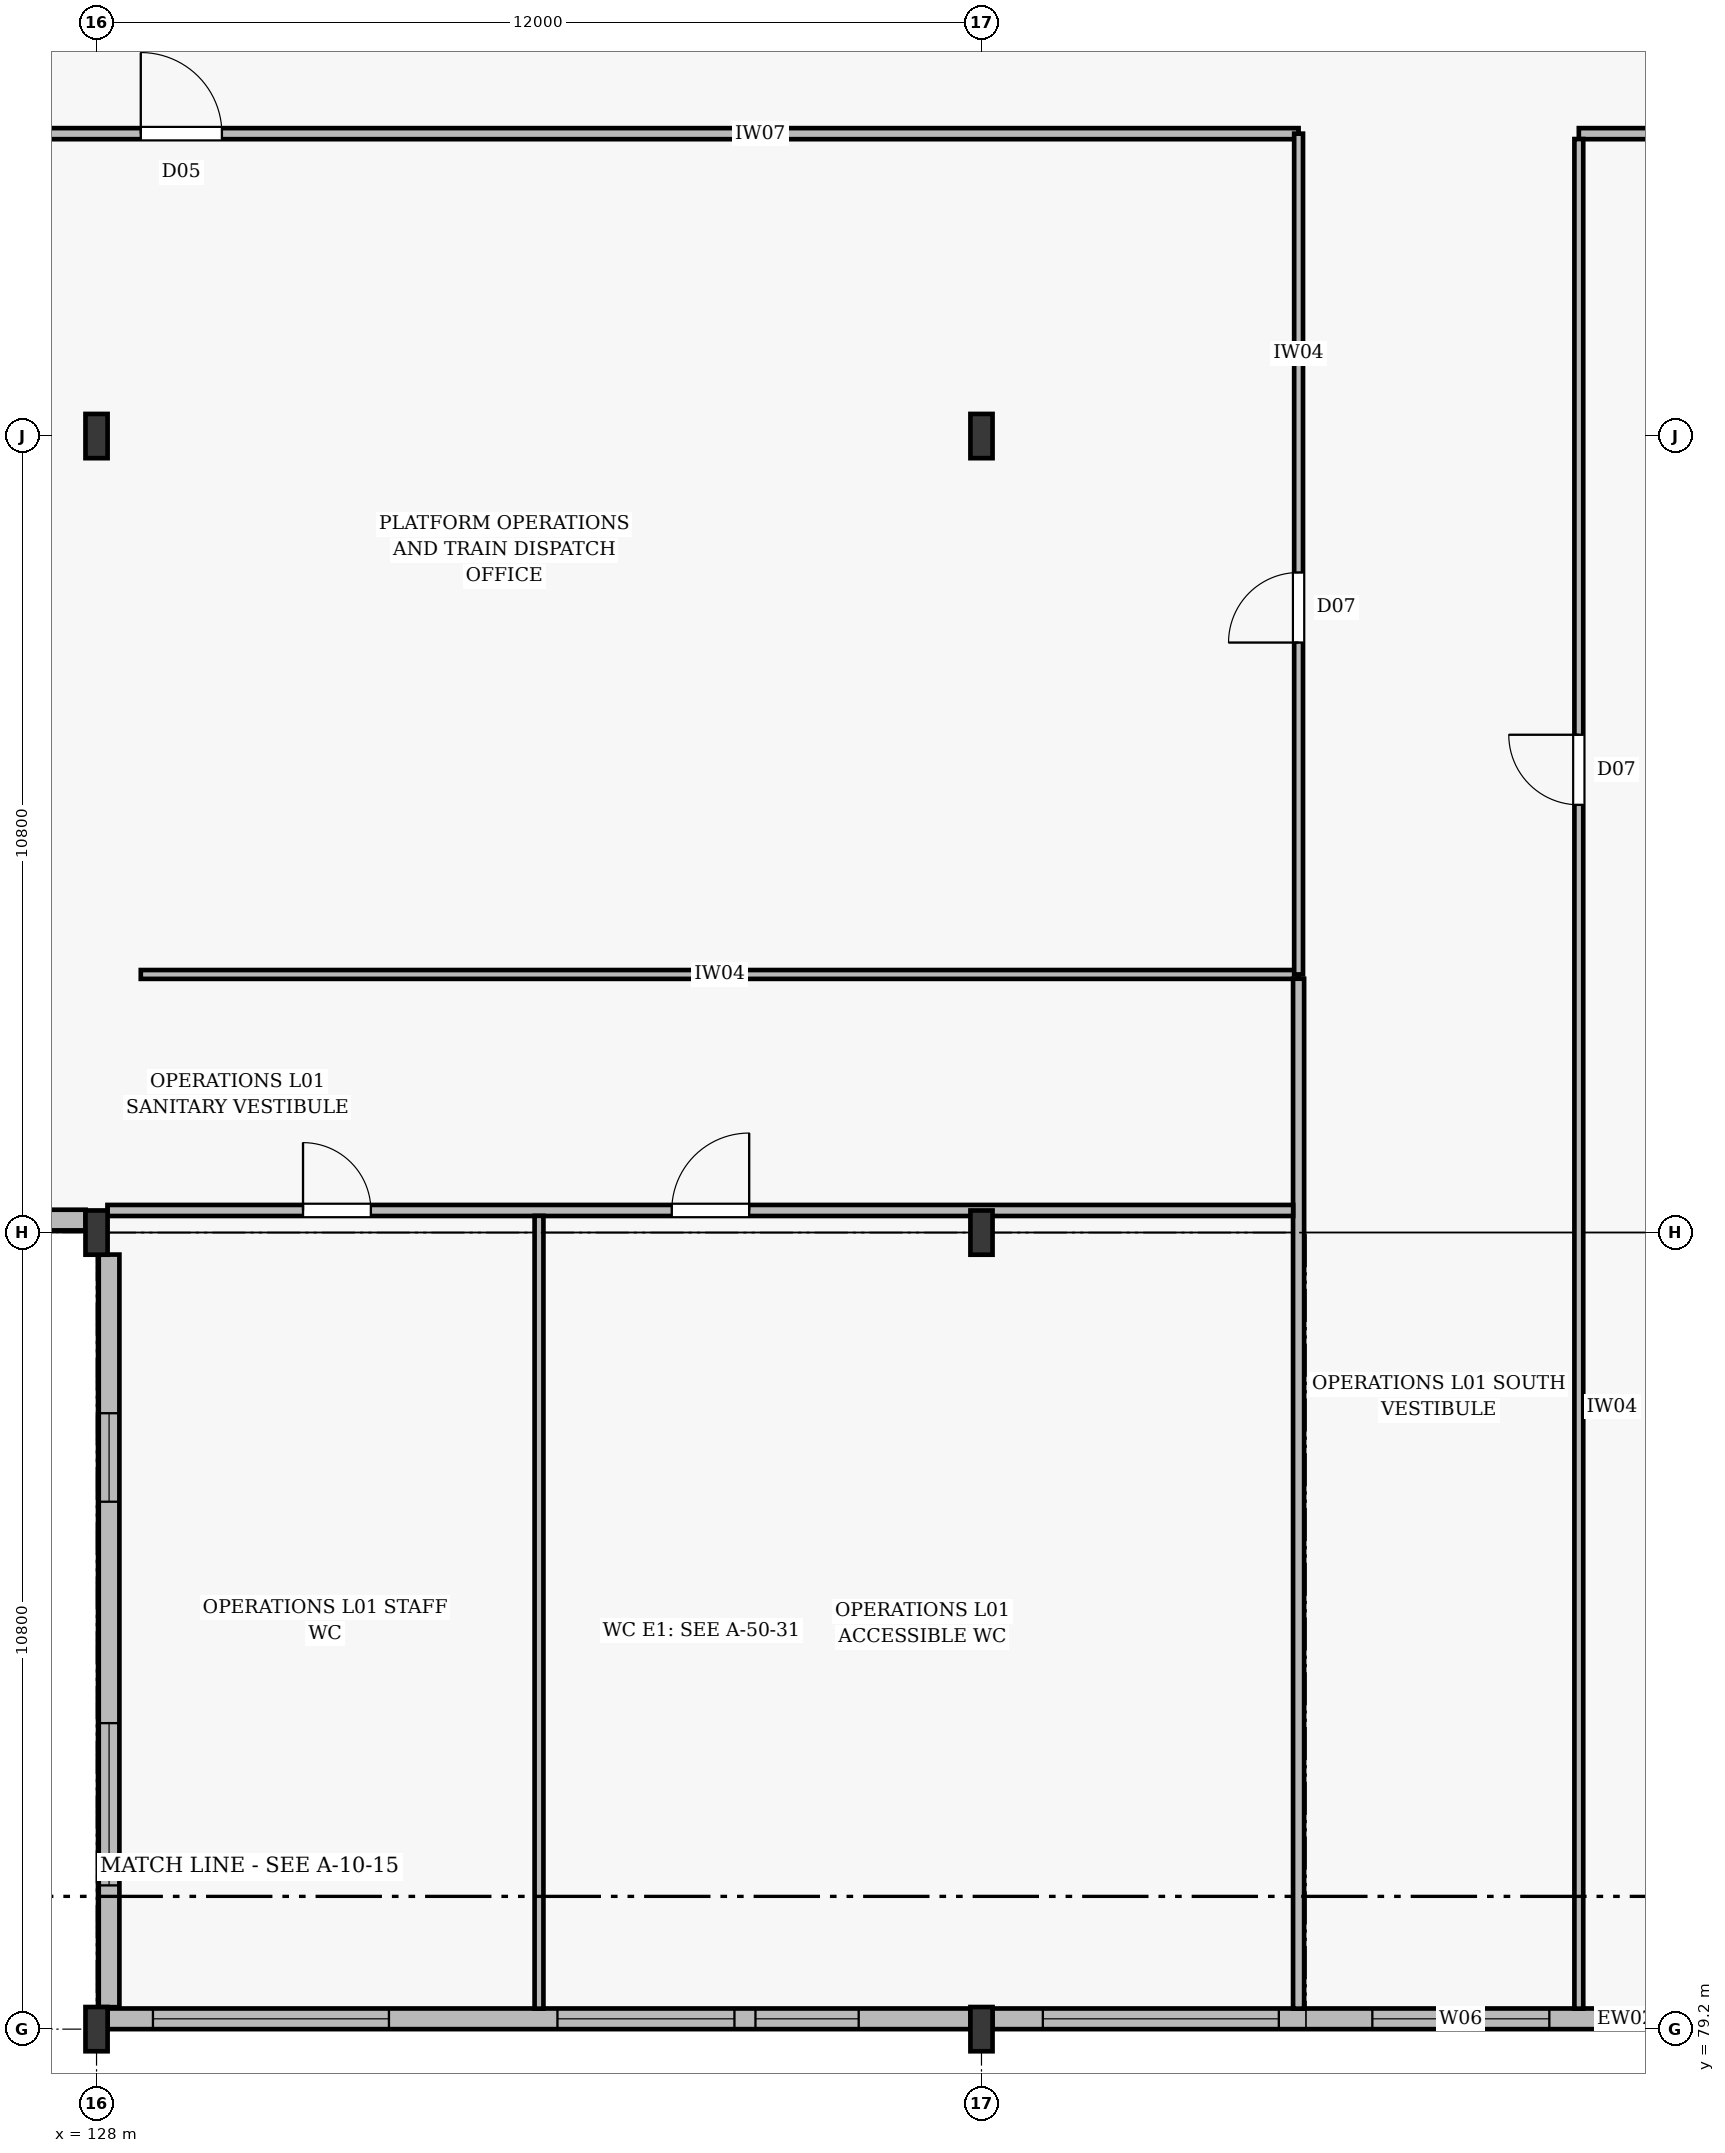
"""IFC4 building model, lengths in metres.
Left out: names, types, materials, properties, quantities, classifications, styles, units other than length and angle.
Written with IfcOpenShell. Run it as: python <this file> out.ifc"""

import sys

from ifc_helpers import new_model, si_unit, direction, frame, frame_2d, origin, origin_2d, place, context, subcontext, project, spatial, rectangle, i_section, extrude, element, fill, save


model = new_model("IFC4")
c1 = context("Model", 3, precision=1e-05, world=origin(), true_north=direction((0.0, 1.0)))
c2 = subcontext(c1, "Body", "Model", "MODEL_VIEW")
j1 = project(units=[si_unit("LENGTHUNIT", "METRE"), si_unit("PLANEANGLEUNIT", "RADIAN")], contexts=[c1])
p1 = place(None, origin())
s1 = spatial("IfcSite", under=j1, at=p1, CompositionType="ELEMENT")
p2 = place(p1, origin())
s2 = spatial("IfcBuilding", under=s1, at=p2, CompositionType="ELEMENT")
p3 = place(p2, frame((0.0, 0.0, 6.6)))
s3 = spatial("IfcBuildingStorey", under=s2, at=p3, CompositionType="ELEMENT", Elevation=6.6)
for number, where, z_axis, x_axis in (
    (1, (128.0, 79.2, 0.0), (0.0, 0.0, 1.0), (1.0, 0.0, 0.0)),
    (2, (128.0, 90.0, 0.0), (0.0, 0.0, 1.0), (1.0, 0.0, 0.0)),
    (3, (128.0, 100.8, 0.0), (0.0, 0.0, 1.0), (1.0, 0.0, 0.0)),
    (4, (140.0, 79.2, 0.0), (0.0, 0.0, 1.0), (1.0, 0.0, 0.0)),
    (5, (140.0, 90.0, 0.0), (0.0, 0.0, 1.0), (1.0, 0.0, 0.0)),
    (6, (140.0, 100.8, 0.0), (0.0, 0.0, 1.0), (1.0, 0.0, 0.0)),
):
    element("IfcColumn", number, at=place(p3, frame(where, z_axis=z_axis, x_axis=x_axis)), inside=s3, PredefinedType="COLUMN", context=c2, shape_type="SweptSolid", body=[
        extrude(i_section(OverallWidth=0.3, OverallDepth=0.6, WebThickness=0.015, FlangeThickness=0.029, at=origin_2d()), origin(), (0.0, 0.0, 1.0), 6.0),
    ])
p4 = place(p3, frame((128.148, 79.34, 0.0), z_axis=(0.0, 0.0, 1.0), x_axis=(1.0, 0.0, 0.0)))
e7 = element("IfcWall", 7, at=p4, inside=s3, PredefinedType="STANDARD", context=c2, shape_type="SweptSolid", body=[
    extrude(rectangle(XDim=11.704, YDim=0.28, at=frame_2d((5.852, 0.0))), origin(), (0.0, 0.0, 1.0), 5.09),
])
p5 = place(p4, frame((0.617, 0.0, 0.75)))
e8 = element("IfcOpeningElement", 8, at=p5, cuts=e7, PredefinedType="OPENING", context=c2, shape_type="SweptSolid", body=[
    extrude(rectangle(XDim=3.2, YDim=2.8, at=frame_2d((1.6, 1.4))), frame((0.0, 0.152, 0.0), z_axis=(0.0, -1.0, 0.0), x_axis=(1.0, 0.0, 0.0)), (0.0, 0.0, 1.0), 0.304),
])
p6 = place(p4, frame((6.102, 0.0, 0.75)))
e9 = element("IfcOpeningElement", 9, at=p6, cuts=e7, PredefinedType="OPENING", context=c2, shape_type="SweptSolid", body=[
    extrude(rectangle(XDim=2.4, YDim=2.4, at=frame_2d((1.2, 1.2))), frame((0.0, 0.152, 0.0), z_axis=(0.0, -1.0, 0.0), x_axis=(1.0, 0.0, 0.0)), (0.0, 0.0, 1.0), 0.304),
])
p7 = place(p4, frame((8.787, 0.0, 1.05)))
e10 = element("IfcOpeningElement", 10, at=p7, cuts=e7, PredefinedType="OPENING", context=c2, shape_type="SweptSolid", body=[
    extrude(rectangle(XDim=1.4, YDim=1.8, at=frame_2d((0.7, 0.9))), frame((0.0, 0.152, 0.0), z_axis=(0.0, -1.0, 0.0), x_axis=(1.0, 0.0, 0.0)), (0.0, 0.0, 1.0), 0.304),
])
p8 = place(p3, frame((140.148, 79.34, 0.0), z_axis=(0.0, 0.0, 1.0), x_axis=(1.0, 0.0, 0.0)))
e11 = element("IfcWall", 11, at=p8, inside=s3, PredefinedType="STANDARD", context=c2, shape_type="SweptSolid", body=[
    extrude(rectangle(XDim=12.704, YDim=0.28, at=frame_2d((6.352, 0.0))), origin(), (0.0, 0.0, 1.0), 5.09),
])
p9 = place(p8, frame((0.684, 0.0, 0.75)))
e12 = element("IfcOpeningElement", 12, at=p9, cuts=e11, PredefinedType="OPENING", context=c2, shape_type="SweptSolid", body=[
    extrude(rectangle(XDim=3.2, YDim=2.8, at=frame_2d((1.6, 1.4))), frame((0.0, 0.152, 0.0), z_axis=(0.0, -1.0, 0.0), x_axis=(1.0, 0.0, 0.0)), (0.0, 0.0, 1.0), 0.304),
])
p10 = place(p8, frame((5.152, 0.0, 0.75)))
e13 = element("IfcOpeningElement", 13, at=p10, cuts=e11, PredefinedType="OPENING", context=c2, shape_type="SweptSolid", body=[
    extrude(rectangle(XDim=2.4, YDim=2.4, at=frame_2d((1.2, 1.2))), frame((0.0, 0.152, 0.0), z_axis=(0.0, -1.0, 0.0), x_axis=(1.0, 0.0, 0.0)), (0.0, 0.0, 1.0), 0.304),
])
p11 = place(p8, frame((9.62, 0.0, 1.05)))
e14 = element("IfcOpeningElement", 14, at=p11, cuts=e11, PredefinedType="OPENING", context=c2, shape_type="SweptSolid", body=[
    extrude(rectangle(XDim=1.4, YDim=1.8, at=frame_2d((0.7, 0.9))), frame((0.0, 0.152, 0.0), z_axis=(0.0, -1.0, 0.0), x_axis=(1.0, 0.0, 0.0)), (0.0, 0.0, 1.0), 0.304),
])
p12 = place(p3, frame((118.148, 90.17, 0.0), z_axis=(0.0, 0.0, 1.0), x_axis=(1.0, 0.0, 0.0)))
e15 = element("IfcWall", 15, at=p12, inside=s3, PredefinedType="STANDARD", context=c2, shape_type="SweptSolid", body=[
    extrude(rectangle(XDim=9.704, YDim=0.28, at=frame_2d((4.852, 0.0))), origin(), (0.0, 0.0, 1.0), 5.15),
])
p13 = place(p12, frame((1.026, 0.0, 0.75)))
e16 = element("IfcOpeningElement", 16, at=p13, cuts=e15, PredefinedType="OPENING", context=c2, shape_type="SweptSolid", body=[
    extrude(rectangle(XDim=3.2, YDim=2.8, at=frame_2d((1.6, 1.4))), frame((0.0, 0.152, 0.0), z_axis=(0.0, -1.0, 0.0), x_axis=(1.0, 0.0, 0.0)), (0.0, 0.0, 1.0), 0.304),
])
p14 = place(p12, frame((5.878, 0.0, 0.75)))
e17 = element("IfcOpeningElement", 17, at=p14, cuts=e15, PredefinedType="OPENING", context=c2, shape_type="SweptSolid", body=[
    extrude(rectangle(XDim=2.4, YDim=2.4, at=frame_2d((1.2, 1.2))), frame((0.0, 0.152, 0.0), z_axis=(0.0, -1.0, 0.0), x_axis=(1.0, 0.0, 0.0)), (0.0, 0.0, 1.0), 0.304),
])
p15 = place(p3, frame((128.17, 79.498, 0.0), z_axis=(0.0, 0.0, 1.0), x_axis=(0.0, 1.0, 0.0)))
e18 = element("IfcWall", 18, at=p15, inside=s3, PredefinedType="STANDARD", context=c2, shape_type="SweptSolid", body=[
    extrude(rectangle(XDim=10.204, YDim=0.28, at=frame_2d((5.102, 0.0))), origin(), (0.0, 0.0, 1.0), 5.09),
])
p16 = place(p15, frame((1.651, 0.0, 0.75)))
e19 = element("IfcOpeningElement", 19, at=p16, cuts=e18, PredefinedType="OPENING", context=c2, shape_type="SweptSolid", body=[
    extrude(rectangle(XDim=2.2, YDim=2.2, at=frame_2d((1.1, 1.1))), frame((0.0, 0.152, 0.0), z_axis=(0.0, -1.0, 0.0), x_axis=(1.0, 0.0, 0.0)), (0.0, 0.0, 1.0), 0.304),
])
p17 = place(p15, frame((6.853, 0.0, 1.05)))
e20 = element("IfcOpeningElement", 20, at=p17, cuts=e18, PredefinedType="OPENING", context=c2, shape_type="SweptSolid", body=[
    extrude(rectangle(XDim=1.2, YDim=0.9, at=frame_2d((0.6, 0.45))), frame((0.0, 0.152, 0.0), z_axis=(0.0, -1.0, 0.0), x_axis=(1.0, 0.0, 0.0)), (0.0, 0.0, 1.0), 0.304),
])
p18 = place(p3, frame((118.338, 104.9, 0.0), z_axis=(0.0, 0.0, 1.0), x_axis=(1.0, 0.0, 0.0)))
e21 = element("IfcWall", 21, at=p18, inside=s3, PredefinedType="PARTITIONING", context=c2, shape_type="SweptSolid", body=[
    extrude(rectangle(XDim=25.962, YDim=0.15, at=frame_2d((12.981, 0.0))), origin(), (0.0, 0.0, 1.0), 5.29),
])
p19 = place(p18, frame((10.262, 0.0, 0.005)))
e22 = element("IfcOpeningElement", 22, at=p19, cuts=e21, PredefinedType="OPENING", context=c2, shape_type="SweptSolid", body=[
    extrude(rectangle(XDim=1.1, YDim=2.1, at=frame_2d((0.55, 1.05))), frame((0.0, 0.087, 0.0), z_axis=(0.0, -1.0, 0.0), x_axis=(1.0, 0.0, 0.0)), (0.0, 0.0, 1.0), 0.174),
])
p20 = place(p3, frame((148.1, 104.9, 0.0), z_axis=(0.0, 0.0, 1.0), x_axis=(1.0, 0.0, 0.0)))
e23 = element("IfcWall", 23, at=p20, inside=s3, PredefinedType="PARTITIONING", context=c2, shape_type="SweptSolid", body=[
    extrude(rectangle(XDim=31.662, YDim=0.15, at=frame_2d((15.831, 0.0))), origin(), (0.0, 0.0, 1.0), 5.29),
])
p21 = place(p20, frame((7.0, 0.0, 0.005)))
e24 = element("IfcOpeningElement", 24, at=p21, cuts=e23, PredefinedType="OPENING", context=c2, shape_type="SweptSolid", body=[
    extrude(rectangle(XDim=1.1, YDim=2.1, at=frame_2d((0.55, 1.05))), frame((0.0, 0.087, 0.0), z_axis=(0.0, -1.0, 0.0), x_axis=(1.0, 0.0, 0.0)), (0.0, 0.0, 1.0), 0.174),
])
p22 = place(p20, frame((22.0, 0.0, 0.005)))
e25 = element("IfcOpeningElement", 25, at=p22, cuts=e23, PredefinedType="OPENING", context=c2, shape_type="SweptSolid", body=[
    extrude(rectangle(XDim=1.0, YDim=2.1, at=frame_2d((0.5, 1.05))), frame((0.0, 0.087, 0.0), z_axis=(0.0, -1.0, 0.0), x_axis=(1.0, 0.0, 0.0)), (0.0, 0.0, 1.0), 0.174),
])
p23 = place(p3, frame((128.6, 93.5, 0.0), z_axis=(0.0, 0.0, 1.0), x_axis=(1.0, 0.0, 0.0)))
e26 = element("IfcWall", 26, at=p23, inside=s3, PredefinedType="PARTITIONING", context=c2, shape_type="SweptSolid", body=[
    extrude(rectangle(XDim=15.7, YDim=0.12, at=frame_2d((7.85, 0.0))), origin(), (0.0, 0.0, 1.0), 5.29),
])
p24 = place(p3, frame((144.3, 93.5, 0.0), z_axis=(0.0, 0.0, 1.0), x_axis=(0.0, 1.0, 0.0)))
e27 = element("IfcWall", 27, at=p24, inside=s3, PredefinedType="PARTITIONING", context=c2, shape_type="SweptSolid", body=[
    extrude(rectangle(XDim=11.4, YDim=0.12, at=frame_2d((5.7, 0.0))), origin(), (0.0, 0.0, 1.0), 5.14),
])
p25 = place(p24, frame((4.5, 0.0, 0.005)))
e28 = element("IfcOpeningElement", 28, at=p25, cuts=e27, PredefinedType="OPENING", context=c2, shape_type="SweptSolid", body=[
    extrude(rectangle(XDim=0.95, YDim=2.1, at=frame_2d((0.475, 1.05))), frame((0.0, 0.072, 0.0), z_axis=(0.0, -1.0, 0.0), x_axis=(1.0, 0.0, 0.0)), (0.0, 0.0, 1.0), 0.144),
])
p26 = place(p3, frame((144.3, 79.478, 0.0), z_axis=(0.0, 0.0, 1.0), x_axis=(0.0, 1.0, 0.0)))
e29 = element("IfcWall", 29, at=p26, inside=s3, PredefinedType="PARTITIONING", context=c2, shape_type="SweptSolid", body=[
    extrude(rectangle(XDim=13.964, YDim=0.15, at=frame_2d((6.982, 0.0))), origin(), (0.0, 0.0, 1.0), 5.14),
])
p27 = place(p3, frame((148.1, 79.478, 0.0), z_axis=(0.0, 0.0, 1.0), x_axis=(0.0, 1.0, 0.0)))
e30 = element("IfcWall", 30, at=p27, inside=s3, PredefinedType="PARTITIONING", context=c2, shape_type="SweptSolid", body=[
    extrude(rectangle(XDim=25.349, YDim=0.12, at=frame_2d((12.674, 0.0))), origin(), (0.0, 0.0, 1.0), 5.14),
])
p28 = place(p27, frame((16.322, 0.0, 0.005)))
e31 = element("IfcOpeningElement", 31, at=p28, cuts=e30, PredefinedType="OPENING", context=c2, shape_type="SweptSolid", body=[
    extrude(rectangle(XDim=0.95, YDim=2.1, at=frame_2d((0.475, 1.05))), frame((0.0, 0.072, 0.0), z_axis=(0.0, -1.0, 0.0), x_axis=(1.0, 0.0, 0.0)), (0.0, 0.0, 1.0), 0.144),
])
p29 = place(p3, frame((128.148, 90.3, 0.0), z_axis=(0.0, 0.0, 1.0), x_axis=(1.0, 0.0, 0.0)))
e32 = element("IfcWall", 32, at=p29, inside=s3, PredefinedType="PARTITIONING", context=c2, shape_type="SweptSolid", body=[
    extrude(rectangle(XDim=16.079, YDim=0.15, at=frame_2d((8.04, 0.0))), origin(), (0.0, 0.0, 1.0), 5.14),
])
p30 = place(p29, frame((2.652, 0.0, 0.005)))
e33 = element("IfcOpeningElement", 33, at=p30, cuts=e32, PredefinedType="OPENING", context=c2, shape_type="SweptSolid", body=[
    extrude(rectangle(XDim=0.92, YDim=2.12, at=frame_2d((0.46, 1.06))), frame((0.0, 0.087, 0.0), z_axis=(0.0, -1.0, 0.0), x_axis=(1.0, 0.0, 0.0)), (0.0, 0.0, 1.0), 0.174),
])
p31 = place(p29, frame((7.652, 0.0, 0.005)))
e34 = element("IfcOpeningElement", 34, at=p31, cuts=e32, PredefinedType="OPENING", context=c2, shape_type="SweptSolid", body=[
    extrude(rectangle(XDim=1.05, YDim=2.15, at=frame_2d((0.525, 1.075))), frame((0.0, 0.087, 0.0), z_axis=(0.0, -1.0, 0.0), x_axis=(1.0, 0.0, 0.0)), (0.0, 0.0, 1.0), 0.174),
])
p32 = place(p3, frame((134.0, 79.478, 0.0), z_axis=(0.0, 0.0, 1.0), x_axis=(0.0, 1.0, 0.0)))
e35 = element("IfcWall", 35, at=p32, inside=s3, PredefinedType="PARTITIONING", context=c2, shape_type="SweptSolid", body=[
    extrude(rectangle(XDim=10.749, YDim=0.12, at=frame_2d((5.375, 0.0))), origin(), (0.0, 0.0, 1.0), 5.24),
])
p33 = place(p5, origin())
e36 = element("IfcWindow", 36, at=p33, inside=s3, PartitioningType="DOUBLE_PANEL_VERTICAL", PredefinedType="WINDOW", context=c2, shape_type="SweptSolid", body=[
    extrude(rectangle(XDim=3.2, YDim=2.8, at=frame_2d((1.6, 1.4))), frame((0.0, 0.03, 0.0), z_axis=(0.0, -1.0, 0.0), x_axis=(1.0, 0.0, 0.0)), (0.0, 0.0, 1.0), 0.06),
])
fill(e8, e36)
p34 = place(p6, origin())
e37 = element("IfcWindow", 37, at=p34, inside=s3, PartitioningType="DOUBLE_PANEL_VERTICAL", PredefinedType="WINDOW", context=c2, shape_type="SweptSolid", body=[
    extrude(rectangle(XDim=2.4, YDim=2.4, at=frame_2d((1.2, 1.2))), frame((0.0, 0.03, 0.0), z_axis=(0.0, -1.0, 0.0), x_axis=(1.0, 0.0, 0.0)), (0.0, 0.0, 1.0), 0.06),
])
fill(e9, e37)
p35 = place(p7, origin())
e38 = element("IfcWindow", 38, at=p35, inside=s3, PartitioningType="DOUBLE_PANEL_VERTICAL", PredefinedType="WINDOW", context=c2, shape_type="SweptSolid", body=[
    extrude(rectangle(XDim=1.4, YDim=1.8, at=frame_2d((0.7, 0.9))), frame((0.0, 0.03, 0.0), z_axis=(0.0, -1.0, 0.0), x_axis=(1.0, 0.0, 0.0)), (0.0, 0.0, 1.0), 0.06),
])
fill(e10, e38)
p36 = place(p9, origin())
e39 = element("IfcWindow", 39, at=p36, inside=s3, PartitioningType="DOUBLE_PANEL_VERTICAL", PredefinedType="WINDOW", context=c2, shape_type="SweptSolid", body=[
    extrude(rectangle(XDim=3.2, YDim=2.8, at=frame_2d((1.6, 1.4))), frame((0.0, 0.03, 0.0), z_axis=(0.0, -1.0, 0.0), x_axis=(1.0, 0.0, 0.0)), (0.0, 0.0, 1.0), 0.06),
])
fill(e12, e39)
p37 = place(p10, origin())
e40 = element("IfcWindow", 40, at=p37, inside=s3, PartitioningType="DOUBLE_PANEL_VERTICAL", PredefinedType="WINDOW", context=c2, shape_type="SweptSolid", body=[
    extrude(rectangle(XDim=2.4, YDim=2.4, at=frame_2d((1.2, 1.2))), frame((0.0, 0.03, 0.0), z_axis=(0.0, -1.0, 0.0), x_axis=(1.0, 0.0, 0.0)), (0.0, 0.0, 1.0), 0.06),
])
fill(e13, e40)
p38 = place(p16, origin())
e41 = element("IfcWindow", 41, at=p38, inside=s3, PartitioningType="DOUBLE_PANEL_VERTICAL", PredefinedType="WINDOW", context=c2, shape_type="SweptSolid", body=[
    extrude(rectangle(XDim=2.2, YDim=2.2, at=frame_2d((1.1, 1.1))), frame((0.0, 0.03, 0.0), z_axis=(0.0, -1.0, 0.0), x_axis=(1.0, 0.0, 0.0)), (0.0, 0.0, 1.0), 0.06),
])
fill(e19, e41)
p39 = place(p17, origin())
e42 = element("IfcWindow", 42, at=p39, inside=s3, PartitioningType="DOUBLE_PANEL_VERTICAL", PredefinedType="WINDOW", context=c2, shape_type="SweptSolid", body=[
    extrude(rectangle(XDim=1.2, YDim=0.9, at=frame_2d((0.6, 0.45))), frame((0.0, 0.03, 0.0), z_axis=(0.0, -1.0, 0.0), x_axis=(1.0, 0.0, 0.0)), (0.0, 0.0, 1.0), 0.06),
])
fill(e20, e42)
p40 = place(p19, origin())
e43 = element("IfcDoor", 43, at=p40, inside=s3, OperationType="SINGLE_SWING_LEFT", PredefinedType="DOOR", context=c2, shape_type="SweptSolid", body=[
    extrude(rectangle(XDim=1.1, YDim=2.1, at=frame_2d((0.55, 1.05))), frame((0.0, 0.025, 0.0), z_axis=(0.0, -1.0, 0.0), x_axis=(1.0, 0.0, 0.0)), (0.0, 0.0, 1.0), 0.05),
])
fill(e22, e43)
p41 = place(p25, origin())
e44 = element("IfcDoor", 44, at=p41, inside=s3, OperationType="SINGLE_SWING_LEFT", PredefinedType="DOOR", context=c2, shape_type="SweptSolid", body=[
    extrude(rectangle(XDim=0.95, YDim=2.1, at=frame_2d((0.475, 1.05))), frame((0.0, 0.025, 0.0), z_axis=(0.0, -1.0, 0.0), x_axis=(1.0, 0.0, 0.0)), (0.0, 0.0, 1.0), 0.05),
])
fill(e28, e44)
p42 = place(p28, origin())
e45 = element("IfcDoor", 45, at=p42, inside=s3, OperationType="SINGLE_SWING_RIGHT", PredefinedType="DOOR", context=c2, shape_type="SweptSolid", body=[
    extrude(rectangle(XDim=0.95, YDim=2.1, at=frame_2d((0.475, 1.05))), frame((0.0, 0.025, 0.0), z_axis=(0.0, -1.0, 0.0), x_axis=(1.0, 0.0, 0.0)), (0.0, 0.0, 1.0), 0.05),
])
fill(e31, e45)
p43 = place(p30, origin())
e46 = element("IfcDoor", 46, at=p43, inside=s3, OperationType="SINGLE_SWING_LEFT", PredefinedType="DOOR", context=c2, shape_type="SweptSolid", body=[
    extrude(rectangle(XDim=0.92, YDim=2.12, at=frame_2d((0.46, 1.06))), frame((0.0, 0.025, 0.0), z_axis=(0.0, -1.0, 0.0), x_axis=(1.0, 0.0, 0.0)), (0.0, 0.0, 1.0), 0.05),
])
fill(e33, e46)
p44 = place(p31, origin())
e47 = element("IfcDoor", 47, at=p44, inside=s3, OperationType="SINGLE_SWING_RIGHT", PredefinedType="DOOR", context=c2, shape_type="SweptSolid", body=[
    extrude(rectangle(XDim=1.05, YDim=2.15, at=frame_2d((0.525, 1.075))), frame((0.0, 0.025, 0.0), z_axis=(0.0, -1.0, 0.0), x_axis=(1.0, 0.0, 0.0)), (0.0, 0.0, 1.0), 0.05),
])
fill(e34, e47)
save(model, sys.argv[1])
